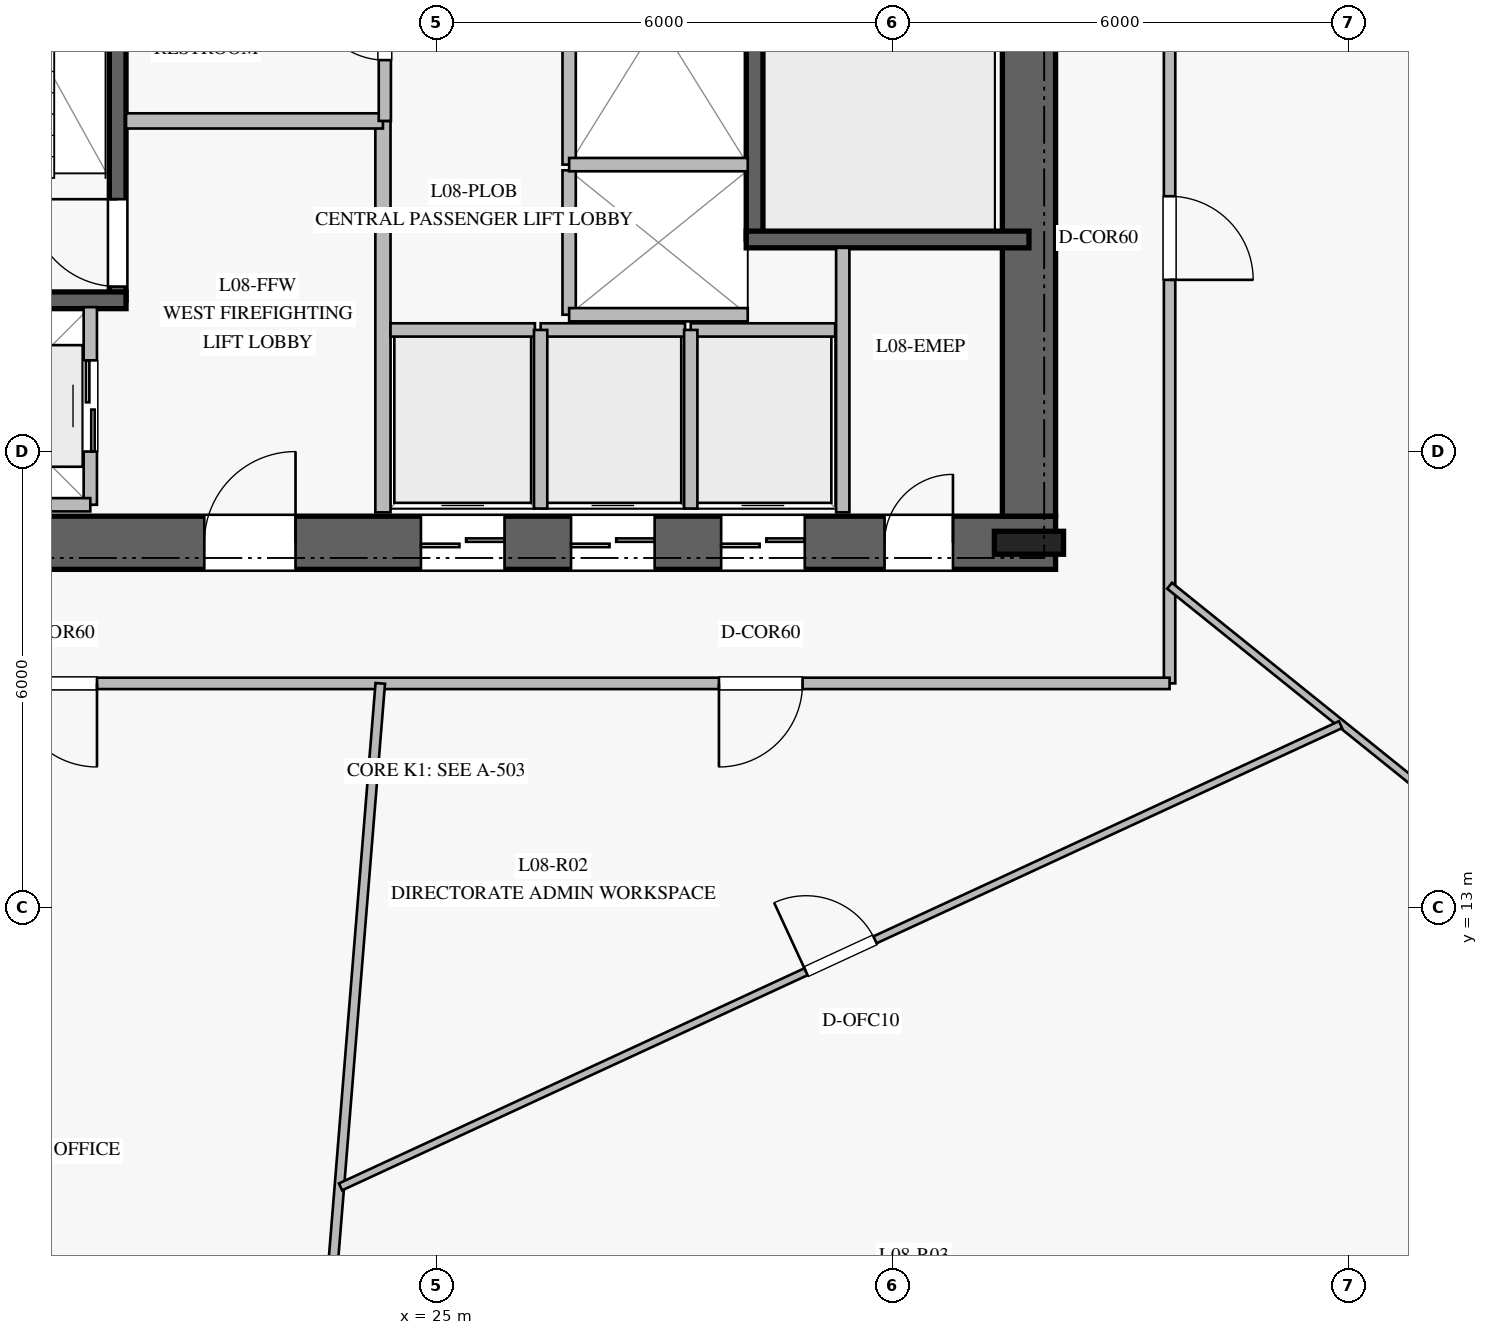
"""IFC4 building model, lengths in metres.
Left out: names, types, materials, properties, quantities, classifications, styles, units other than length and angle.
Written with IfcOpenShell. Run it as: python <this file> out.ifc"""

import sys

from ifc_helpers import new_model, si_unit, direction, frame, frame_2d, origin, origin_2d, place, context, subcontext, project, spatial, rectangle, i_section, extrude, element, fill, save


model = new_model("IFC4")
c1 = context("Model", 3, precision=1e-05, world=origin(), true_north=direction((0.0, 1.0)))
c2 = subcontext(c1, "Body", "Model", "MODEL_VIEW")
j1 = project(units=[si_unit("LENGTHUNIT", "METRE"), si_unit("PLANEANGLEUNIT", "RADIAN")], contexts=[c1])
p1 = place(None, origin())
s1 = spatial("IfcSite", under=j1, at=p1, CompositionType="ELEMENT")
p2 = place(p1, origin())
s2 = spatial("IfcBuilding", under=s1, at=p2, CompositionType="ELEMENT")
p3 = place(p2, frame((0.0, 0.0, 36.0)))
s3 = spatial("IfcBuildingStorey", under=s2, at=p3, CompositionType="ELEMENT", Elevation=36.0)
p4 = place(p3, frame((16.85, 17.8, 0.0), z_axis=(0.0, 0.0, 1.0), x_axis=(1.0, 0.0, 0.0)))
e1 = element("IfcWall", 1, at=p4, inside=s3, PredefinedType="SHEAR", context=c2, shape_type="SweptSolid", body=[
    extrude(rectangle(XDim=16.3, YDim=0.7, at=frame_2d((8.15, 0.0))), origin(), (0.0, 0.0, 1.0), 3.76),
])
p5 = place(p4, frame((5.1, 0.0, 0.0)))
e2 = element("IfcOpeningElement", 2, at=p5, cuts=e1, PredefinedType="OPENING", context=c2, shape_type="SweptSolid", body=[
    extrude(rectangle(XDim=1.2, YDim=2.25, at=frame_2d((0.6, 1.125))), frame((0.0, 0.36, 0.0), z_axis=(0.0, -1.0, 0.0), x_axis=(1.0, 0.0, 0.0)), (0.0, 0.0, 1.0), 0.72),
])
p6 = place(p4, frame((14.05, 0.0, 0.0)))
e3 = element("IfcOpeningElement", 3, at=p6, cuts=e1, PredefinedType="OPENING", context=c2, shape_type="SweptSolid", body=[
    extrude(rectangle(XDim=0.9, YDim=2.1, at=frame_2d((0.45, 1.05))), frame((0.0, 0.36, 0.0), z_axis=(0.0, -1.0, 0.0), x_axis=(1.0, 0.0, 0.0)), (0.0, 0.0, 1.0), 0.72),
])
p7 = place(p4, frame((7.95, 0.0, 0.0)))
e4 = element("IfcOpeningElement", 4, at=p7, cuts=e1, PredefinedType="OPENING", context=c2, shape_type="SweptSolid", body=[
    extrude(rectangle(XDim=1.1, YDim=2.2, at=frame_2d((0.55, 1.1))), frame((0.0, 0.36, 0.0), z_axis=(0.0, -1.0, 0.0), x_axis=(1.0, 0.0, 0.0)), (0.0, 0.0, 1.0), 0.72),
])
p8 = place(p4, frame((9.925, 0.0, 0.0)))
e5 = element("IfcOpeningElement", 5, at=p8, cuts=e1, PredefinedType="OPENING", context=c2, shape_type="SweptSolid", body=[
    extrude(rectangle(XDim=1.1, YDim=2.2, at=frame_2d((0.55, 1.1))), frame((0.0, 0.36, 0.0), z_axis=(0.0, -1.0, 0.0), x_axis=(1.0, 0.0, 0.0)), (0.0, 0.0, 1.0), 0.72),
])
p9 = place(p4, frame((11.9, 0.0, 0.0)))
e6 = element("IfcOpeningElement", 6, at=p9, cuts=e1, PredefinedType="OPENING", context=c2, shape_type="SweptSolid", body=[
    extrude(rectangle(XDim=1.1, YDim=2.2, at=frame_2d((0.55, 1.1))), frame((0.0, 0.36, 0.0), z_axis=(0.0, -1.0, 0.0), x_axis=(1.0, 0.0, 0.0)), (0.0, 0.0, 1.0), 0.72),
])
p10 = place(p3, frame((32.8, 18.15, 0.0), z_axis=(0.0, 0.0, 1.0), x_axis=(0.0, 1.0, 0.0)))
e7 = element("IfcWall", 7, at=p10, inside=s3, PredefinedType="SHEAR", context=c2, shape_type="SweptSolid", body=[
    extrude(rectangle(XDim=13.7, YDim=0.7, at=frame_2d((6.85, 0.0))), origin(), (0.0, 0.0, 1.0), 3.76),
])
p11 = place(p3, frame((32.8, 17.8, 0.0), z_axis=(0.0, 0.0, 1.0), x_axis=(1.0, 0.0, 0.0)))
e8 = element("IfcColumn", 8, at=p11, inside=s3, PredefinedType="COLUMN", context=c2, shape_type="SweptSolid", body=[
    extrude(i_section(OverallWidth=0.302, OverallDepth=0.91, WebThickness=0.021, FlangeThickness=0.04, at=origin_2d()), origin(), (0.0, 0.0, 1.0), 4.0),
])
p12 = place(p3, frame((20.81, 20.99, 0.0), z_axis=(0.0, 0.0, 1.0), x_axis=(0.0, 1.0, 0.0)))
e9 = element("IfcWall", 9, at=p12, inside=s3, PredefinedType="SOLIDWALL", context=c2, shape_type="SweptSolid", body=[
    extrude(rectangle(XDim=7.22, YDim=0.22, at=frame_2d((3.61, 0.0))), origin(), (0.0, 0.0, 1.0), 3.76),
])
p13 = place(p12, frame((0.18, 0.0, 0.0)))
e10 = element("IfcOpeningElement", 10, at=p13, cuts=e9, PredefinedType="OPENING", context=c2, shape_type="SweptSolid", body=[
    extrude(rectangle(XDim=1.15, YDim=2.2, at=frame_2d((0.575, 1.1))), frame((0.0, 0.12, 0.0), z_axis=(0.0, -1.0, 0.0), x_axis=(1.0, 0.0, 0.0)), (0.0, 0.0, 1.0), 0.24),
])
p14 = place(p3, frame((17.2, 20.99, 0.0), z_axis=(0.0, 0.0, 1.0), x_axis=(1.0, 0.0, 0.0)))
e11 = element("IfcWall", 11, at=p14, inside=s3, PredefinedType="SOLIDWALL", context=c2, shape_type="SweptSolid", body=[
    extrude(rectangle(XDim=3.72, YDim=0.22, at=frame_2d((1.86, 0.0))), origin(), (0.0, 0.0, 1.0), 3.76),
])
p15 = place(p3, frame((29.19, 21.79, 0.0), z_axis=(0.0, 0.0, 1.0), x_axis=(0.0, 1.0, 0.0)))
e12 = element("IfcWall", 12, at=p15, inside=s3, PredefinedType="SOLIDWALL", context=c2, shape_type="SweptSolid", body=[
    extrude(rectangle(XDim=7.22, YDim=0.22, at=frame_2d((3.61, 0.0))), origin(), (0.0, 0.0, 1.0), 3.76),
])
p16 = place(p15, frame((5.88, 0.0, 0.0)))
e13 = element("IfcOpeningElement", 13, at=p16, cuts=e12, PredefinedType="OPENING", context=c2, shape_type="SweptSolid", body=[
    extrude(rectangle(XDim=1.15, YDim=2.2, at=frame_2d((0.575, 1.1))), frame((0.0, 0.12, 0.0), z_axis=(0.0, -1.0, 0.0), x_axis=(1.0, 0.0, 0.0)), (0.0, 0.0, 1.0), 0.24),
])
p17 = place(p3, frame((29.08, 21.79, 0.0), z_axis=(0.0, 0.0, 1.0), x_axis=(1.0, 0.0, 0.0)))
e14 = element("IfcWall", 14, at=p17, inside=s3, PredefinedType="SOLIDWALL", context=c2, shape_type="SweptSolid", body=[
    extrude(rectangle(XDim=3.72, YDim=0.22, at=frame_2d((1.86, 0.0))), origin(), (0.0, 0.0, 1.0), 3.76),
])
p18 = place(p3, frame((24.3, 18.2, 0.0), z_axis=(0.0, 0.0, 1.0), x_axis=(0.0, 1.0, 0.0)))
e15 = element("IfcWall", 15, at=p18, inside=s3, PredefinedType="PARTITIONING", context=c2, shape_type="SweptSolid", body=[
    extrude(rectangle(XDim=5.15, YDim=0.2, at=frame_2d((2.575, 0.0))), origin(), (0.0, 0.0, 1.0), 3.76),
])
p19 = place(p3, frame((20.92, 23.35, 0.0), z_axis=(0.0, 0.0, 1.0), x_axis=(1.0, 0.0, 0.0)))
e16 = element("IfcWall", 16, at=p19, inside=s3, PredefinedType="PARTITIONING", context=c2, shape_type="SweptSolid", body=[
    extrude(rectangle(XDim=3.38, YDim=0.2, at=frame_2d((1.69, 0.0))), origin(), (0.0, 0.0, 1.0), 3.76),
])
p20 = place(p3, frame((24.325, 23.35, 0.0), z_axis=(0.0, 0.0, 1.0), x_axis=(0.0, 1.0, 0.0)))
e17 = element("IfcWall", 17, at=p20, inside=s3, PredefinedType="PLUMBINGWALL", context=c2, shape_type="SweptSolid", body=[
    extrude(rectangle(XDim=4.93, YDim=0.16, at=frame_2d((2.465, 0.0))), origin(), (0.0, 0.0, 1.0), 3.76),
])
p21 = place(p20, frame((0.8, 0.0, 0.0)))
e18 = element("IfcOpeningElement", 18, at=p21, cuts=e17, PredefinedType="OPENING", context=c2, shape_type="SweptSolid", body=[
    extrude(rectangle(XDim=0.95, YDim=2.1, at=frame_2d((0.475, 1.05))), frame((0.0, 0.09, 0.0), z_axis=(0.0, -1.0, 0.0), x_axis=(1.0, 0.0, 0.0)), (0.0, 0.0, 1.0), 0.18),
])
p22 = place(p20, frame((3.26, 0.0, 0.0)))
e19 = element("IfcOpeningElement", 19, at=p22, cuts=e17, PredefinedType="OPENING", context=c2, shape_type="SweptSolid", body=[
    extrude(rectangle(XDim=0.9, YDim=2.1, at=frame_2d((0.45, 1.05))), frame((0.0, 0.09, 0.0), z_axis=(0.0, -1.0, 0.0), x_axis=(1.0, 0.0, 0.0)), (0.0, 0.0, 1.0), 0.18),
])
p23 = place(p3, frame((30.35, 18.2, 0.0), z_axis=(0.0, 0.0, 1.0), x_axis=(0.0, 1.0, 0.0)))
e20 = element("IfcWall", 20, at=p23, inside=s3, PredefinedType="PARTITIONING", context=c2, shape_type="SweptSolid", body=[
    extrude(rectangle(XDim=3.48, YDim=0.175, at=frame_2d((1.74, 0.0))), origin(), (0.0, 0.0, 1.0), 3.76),
])
p24 = place(p3, frame((24.4, 20.6, 0.0), z_axis=(0.0, 0.0, 1.0), x_axis=(1.0, 0.0, 0.0)))
e21 = element("IfcWall", 21, at=p24, inside=s3, PredefinedType="PARTITIONING", context=c2, shape_type="SweptSolid", body=[
    extrude(rectangle(XDim=1.9, YDim=0.175, at=frame_2d((0.95, 0.0))), origin(), (0.0, 0.0, 1.0), 3.76),
])
p25 = place(p3, frame((26.375, 20.6, 0.0), z_axis=(0.0, 0.0, 1.0), x_axis=(1.0, 0.0, 0.0)))
e22 = element("IfcWall", 22, at=p25, inside=s3, PredefinedType="PARTITIONING", context=c2, shape_type="SweptSolid", body=[
    extrude(rectangle(XDim=1.9, YDim=0.175, at=frame_2d((0.95, 0.0))), origin(), (0.0, 0.0, 1.0), 3.76),
])
p26 = place(p3, frame((26.375, 18.25, 0.0), z_axis=(0.0, 0.0, 1.0), x_axis=(0.0, 1.0, 0.0)))
e23 = element("IfcWall", 23, at=p26, inside=s3, PredefinedType="PARTITIONING", context=c2, shape_type="SweptSolid", body=[
    extrude(rectangle(XDim=2.35, YDim=0.175, at=frame_2d((1.175, 0.0))), origin(), (0.0, 0.0, 1.0), 3.76),
])
p27 = place(p3, frame((28.35, 20.6, 0.0), z_axis=(0.0, 0.0, 1.0), x_axis=(1.0, 0.0, 0.0)))
e24 = element("IfcWall", 24, at=p27, inside=s3, PredefinedType="PARTITIONING", context=c2, shape_type="SweptSolid", body=[
    extrude(rectangle(XDim=1.9, YDim=0.175, at=frame_2d((0.95, 0.0))), origin(), (0.0, 0.0, 1.0), 3.76),
])
p28 = place(p3, frame((28.35, 18.25, 0.0), z_axis=(0.0, 0.0, 1.0), x_axis=(0.0, 1.0, 0.0)))
e25 = element("IfcWall", 25, at=p28, inside=s3, PredefinedType="PARTITIONING", context=c2, shape_type="SweptSolid", body=[
    extrude(rectangle(XDim=2.35, YDim=0.175, at=frame_2d((1.175, 0.0))), origin(), (0.0, 0.0, 1.0), 3.76),
])
p29 = place(p3, frame((26.75, 20.8, 0.0), z_axis=(0.0, 0.0, 1.0), x_axis=(0.0, 1.0, 0.0)))
e26 = element("IfcWall", 26, at=p29, inside=s3, PredefinedType="PARTITIONING", context=c2, shape_type="SweptSolid", body=[
    extrude(rectangle(XDim=1.9, YDim=0.175, at=frame_2d((0.95, 0.0))), origin(), (0.0, 0.0, 1.0), 3.76),
])
p30 = place(p3, frame((26.75, 20.8, 0.0), z_axis=(0.0, 0.0, 1.0), x_axis=(1.0, 0.0, 0.0)))
e27 = element("IfcWall", 27, at=p30, inside=s3, PredefinedType="PARTITIONING", context=c2, shape_type="SweptSolid", body=[
    extrude(rectangle(XDim=2.35, YDim=0.175, at=frame_2d((1.175, 0.0))), origin(), (0.0, 0.0, 1.0), 3.76),
])
p31 = place(p3, frame((26.75, 22.775, 0.0), z_axis=(0.0, 0.0, 1.0), x_axis=(0.0, 1.0, 0.0)))
e28 = element("IfcWall", 28, at=p31, inside=s3, PredefinedType="PARTITIONING", context=c2, shape_type="SweptSolid", body=[
    extrude(rectangle(XDim=1.9, YDim=0.175, at=frame_2d((0.95, 0.0))), origin(), (0.0, 0.0, 1.0), 3.76),
])
p32 = place(p3, frame((26.75, 22.775, 0.0), z_axis=(0.0, 0.0, 1.0), x_axis=(1.0, 0.0, 0.0)))
e29 = element("IfcWall", 29, at=p32, inside=s3, PredefinedType="PARTITIONING", context=c2, shape_type="SweptSolid", body=[
    extrude(rectangle(XDim=2.35, YDim=0.175, at=frame_2d((1.175, 0.0))), origin(), (0.0, 0.0, 1.0), 3.76),
])
p33 = place(p3, frame((20.45, 18.3, 0.0), z_axis=(0.0, 0.0, 1.0), x_axis=(0.0, 1.0, 0.0)))
e30 = element("IfcWall", 30, at=p33, inside=s3, PredefinedType="PARTITIONING", context=c2, shape_type="SweptSolid", body=[
    extrude(rectangle(XDim=2.6, YDim=0.175, at=frame_2d((1.3, 0.0))), origin(), (0.0, 0.0, 1.0), 3.76),
])
p34 = place(p33, frame((0.7, 0.0, 0.0)))
e31 = element("IfcOpeningElement", 31, at=p34, cuts=e30, PredefinedType="OPENING", context=c2, shape_type="SweptSolid", body=[
    extrude(rectangle(XDim=1.2, YDim=2.2, at=frame_2d((0.6, 1.1))), frame((0.0, 0.098, 0.0), z_axis=(0.0, -1.0, 0.0), x_axis=(1.0, 0.0, 0.0)), (0.0, 0.0, 1.0), 0.195),
])
p35 = place(p3, frame((17.85, 18.3, 0.0), z_axis=(0.0, 0.0, 1.0), x_axis=(1.0, 0.0, 0.0)))
e32 = element("IfcWall", 32, at=p35, inside=s3, PredefinedType="PARTITIONING", context=c2, shape_type="SweptSolid", body=[
    extrude(rectangle(XDim=2.6, YDim=0.175, at=frame_2d((1.3, 0.0))), origin(), (0.0, 0.0, 1.0), 3.76),
])
p36 = place(p3, frame((34.65, 34.05, 0.0), z_axis=(0.0, 0.0, 1.0), x_axis=(0.0, -1.0, 0.0)))
e33 = element("IfcWall", 33, at=p36, inside=s3, PredefinedType="PARTITIONING", context=c2, shape_type="SweptSolid", body=[
    extrude(rectangle(XDim=18.1, YDim=0.15, at=frame_2d((9.05, 0.0))), origin(), (0.0, 0.0, 1.0), 3.21),
])
p37 = place(p36, frame((11.691, 0.0, 0.0)))
e34 = element("IfcOpeningElement", 34, at=p37, cuts=e33, PredefinedType="OPENING", context=c2, shape_type="SweptSolid", body=[
    extrude(rectangle(XDim=1.1, YDim=2.2, at=frame_2d((0.55, 1.1))), frame((0.0, 0.085, 0.0), z_axis=(0.0, -1.0, 0.0), x_axis=(1.0, 0.0, 0.0)), (0.0, 0.0, 1.0), 0.17),
])
p38 = place(p36, frame((3.343, 0.0, 0.0)))
e35 = element("IfcOpeningElement", 35, at=p38, cuts=e33, PredefinedType="OPENING", context=c2, shape_type="SweptSolid", body=[
    extrude(rectangle(XDim=1.1, YDim=2.2, at=frame_2d((0.55, 1.1))), frame((0.0, 0.085, 0.0), z_axis=(0.0, -1.0, 0.0), x_axis=(1.0, 0.0, 0.0)), (0.0, 0.0, 1.0), 0.17),
])
p39 = place(p3, frame((34.65, 15.95, 0.0), z_axis=(0.0, 0.0, 1.0), x_axis=(-1.0, 0.0, 0.0)))
e36 = element("IfcWall", 36, at=p39, inside=s3, PredefinedType="PARTITIONING", context=c2, shape_type="SweptSolid", body=[
    extrude(rectangle(XDim=19.3, YDim=0.15, at=frame_2d((9.65, 0.0))), origin(), (0.0, 0.0, 1.0), 3.21),
])
p40 = place(p39, frame((14.112, 0.0, 0.0)))
e37 = element("IfcOpeningElement", 37, at=p40, cuts=e36, PredefinedType="OPENING", context=c2, shape_type="SweptSolid", body=[
    extrude(rectangle(XDim=1.1, YDim=2.2, at=frame_2d((0.55, 1.1))), frame((0.0, 0.085, 0.0), z_axis=(0.0, -1.0, 0.0), x_axis=(1.0, 0.0, 0.0)), (0.0, 0.0, 1.0), 0.17),
])
p41 = place(p39, frame((4.829, 0.0, 0.0)))
e38 = element("IfcOpeningElement", 38, at=p41, cuts=e36, PredefinedType="OPENING", context=c2, shape_type="SweptSolid", body=[
    extrude(rectangle(XDim=1.1, YDim=2.2, at=frame_2d((0.55, 1.1))), frame((0.0, 0.085, 0.0), z_axis=(0.0, -1.0, 0.0), x_axis=(1.0, 0.0, 0.0)), (0.0, 0.0, 1.0), 0.17),
])
p42 = place(p3, frame((24.265, 15.95, 0.0), z_axis=(0.0, 0.0, 1.0), x_axis=(-0.081013374565, -0.996713014434, 0.0)))
e39 = element("IfcWall", 39, at=p42, inside=s3, PredefinedType="PARTITIONING", context=c2, shape_type="SweptSolid", body=[
    extrude(rectangle(XDim=12.28, YDim=0.125, at=frame_2d((6.14, 0.0))), origin(), (0.0, 0.0, 1.0), 3.05),
])
p43 = place(p3, frame((34.65, 17.235, 0.0), z_axis=(0.0, 0.0, 1.0), x_axis=(0.779103283346, -0.626895584511, 0.0)))
e40 = element("IfcWall", 40, at=p43, inside=s3, PredefinedType="MOVABLE", context=c2, shape_type="SweptSolid", body=[
    extrude(rectangle(XDim=9.271, YDim=0.1, at=frame_2d((4.635, 0.0))), origin(), (0.0, 0.0, 1.0), 3.06),
])
p44 = place(p3, frame((23.742, 9.326, 0.0), z_axis=(0.0, 0.0, 1.0), x_axis=(0.907733462567, 0.419547328601, 0.0)))
e41 = element("IfcWall", 41, at=p44, inside=s3, PredefinedType="MOVABLE", context=c2, shape_type="SweptSolid", body=[
    extrude(rectangle(XDim=14.494, YDim=0.1, at=frame_2d((7.247, 0.0))), origin(), (0.0, 0.0, 1.0), 3.05),
])
p45 = place(p44, frame((6.747, 0.0, 0.0)))
e42 = element("IfcOpeningElement", 42, at=p45, cuts=e41, PredefinedType="OPENING", context=c2, shape_type="SweptSolid", body=[
    extrude(rectangle(XDim=1.0, YDim=2.15, at=frame_2d((0.5, 1.075))), frame((0.0, 0.06, 0.0), z_axis=(0.0, -1.0, 0.0), x_axis=(1.0, 0.0, 0.0)), (0.0, 0.0, 1.0), 0.12),
])
p46 = place(p13, origin())
e43 = element("IfcDoor", 43, at=p46, inside=s3, OperationType="SINGLE_SWING_RIGHT", PredefinedType="DOOR", context=c2, shape_type="SweptSolid", body=[
    extrude(rectangle(XDim=1.15, YDim=2.2, at=frame_2d((0.575, 1.1))), frame((0.0, 0.025, 0.0), z_axis=(0.0, -1.0, 0.0), x_axis=(1.0, 0.0, 0.0)), (0.0, 0.0, 1.0), 0.05),
])
fill(e10, e43)
p47 = place(p5, origin())
e44 = element("IfcDoor", 44, at=p47, inside=s3, OperationType="SINGLE_SWING_RIGHT", PredefinedType="DOOR", context=c2, shape_type="SweptSolid", body=[
    extrude(rectangle(XDim=1.2, YDim=2.25, at=frame_2d((0.6, 1.125))), frame((0.0, 0.025, 0.0), z_axis=(0.0, -1.0, 0.0), x_axis=(1.0, 0.0, 0.0)), (0.0, 0.0, 1.0), 0.05),
])
fill(e2, e44)
p48 = place(p21, origin())
e45 = element("IfcDoor", 45, at=p48, inside=s3, OperationType="SINGLE_SWING_RIGHT", PredefinedType="DOOR", context=c2, shape_type="SweptSolid", body=[
    extrude(rectangle(XDim=0.95, YDim=2.1, at=frame_2d((0.475, 1.05))), frame((0.0, 0.025, 0.0), z_axis=(0.0, -1.0, 0.0), x_axis=(1.0, 0.0, 0.0)), (0.0, 0.0, 1.0), 0.05),
])
fill(e18, e45)
p49 = place(p6, origin())
e46 = element("IfcDoor", 46, at=p49, inside=s3, OperationType="SINGLE_SWING_RIGHT", PredefinedType="DOOR", context=c2, shape_type="SweptSolid", body=[
    extrude(rectangle(XDim=0.9, YDim=2.1, at=frame_2d((0.45, 1.05))), frame((0.0, 0.025, 0.0), z_axis=(0.0, -1.0, 0.0), x_axis=(1.0, 0.0, 0.0)), (0.0, 0.0, 1.0), 0.05),
])
fill(e3, e46)
p50 = place(p7, origin())
e47 = element("IfcDoor", 47, at=p50, inside=s3, OperationType="DOUBLE_DOOR_SLIDING", PredefinedType="DOOR", context=c2, shape_type="SweptSolid", body=[
    extrude(rectangle(XDim=1.1, YDim=2.2, at=frame_2d((0.55, 1.1))), frame((0.0, 0.025, 0.0), z_axis=(0.0, -1.0, 0.0), x_axis=(1.0, 0.0, 0.0)), (0.0, 0.0, 1.0), 0.05),
])
fill(e4, e47)
p51 = place(p8, origin())
e48 = element("IfcDoor", 48, at=p51, inside=s3, OperationType="DOUBLE_DOOR_SLIDING", PredefinedType="DOOR", context=c2, shape_type="SweptSolid", body=[
    extrude(rectangle(XDim=1.1, YDim=2.2, at=frame_2d((0.55, 1.1))), frame((0.0, 0.025, 0.0), z_axis=(0.0, -1.0, 0.0), x_axis=(1.0, 0.0, 0.0)), (0.0, 0.0, 1.0), 0.05),
])
fill(e5, e48)
p52 = place(p9, origin())
e49 = element("IfcDoor", 49, at=p52, inside=s3, OperationType="DOUBLE_DOOR_SLIDING", PredefinedType="DOOR", context=c2, shape_type="SweptSolid", body=[
    extrude(rectangle(XDim=1.1, YDim=2.2, at=frame_2d((0.55, 1.1))), frame((0.0, 0.025, 0.0), z_axis=(0.0, -1.0, 0.0), x_axis=(1.0, 0.0, 0.0)), (0.0, 0.0, 1.0), 0.05),
])
fill(e6, e49)
p53 = place(p34, origin())
e50 = element("IfcDoor", 50, at=p53, inside=s3, OperationType="DOUBLE_DOOR_SLIDING", PredefinedType="DOOR", context=c2, shape_type="SweptSolid", body=[
    extrude(rectangle(XDim=1.2, YDim=2.2, at=frame_2d((0.6, 1.1))), frame((0.0, 0.025, 0.0), z_axis=(0.0, -1.0, 0.0), x_axis=(1.0, 0.0, 0.0)), (0.0, 0.0, 1.0), 0.05),
])
fill(e31, e50)
p54 = place(p40, origin())
e51 = element("IfcDoor", 51, at=p54, inside=s3, OperationType="SINGLE_SWING_LEFT", PredefinedType="DOOR", context=c2, shape_type="SweptSolid", body=[
    extrude(rectangle(XDim=1.1, YDim=2.2, at=frame_2d((0.55, 1.1))), frame((0.0, 0.025, 0.0), z_axis=(0.0, -1.0, 0.0), x_axis=(1.0, 0.0, 0.0)), (0.0, 0.0, 1.0), 0.05),
])
fill(e37, e51)
p55 = place(p41, origin())
e52 = element("IfcDoor", 52, at=p55, inside=s3, OperationType="SINGLE_SWING_RIGHT", PredefinedType="DOOR", context=c2, shape_type="SweptSolid", body=[
    extrude(rectangle(XDim=1.1, YDim=2.2, at=frame_2d((0.55, 1.1))), frame((0.0, 0.025, 0.0), z_axis=(0.0, -1.0, 0.0), x_axis=(1.0, 0.0, 0.0)), (0.0, 0.0, 1.0), 0.05),
])
fill(e38, e52)
p56 = place(p45, origin())
e53 = element("IfcDoor", 53, at=p56, inside=s3, OperationType="SINGLE_SWING_LEFT", PredefinedType="DOOR", context=c2, shape_type="SweptSolid", body=[
    extrude(rectangle(XDim=1.0, YDim=2.15, at=frame_2d((0.5, 1.075))), frame((0.0, 0.025, 0.0), z_axis=(0.0, -1.0, 0.0), x_axis=(1.0, 0.0, 0.0)), (0.0, 0.0, 1.0), 0.05),
])
fill(e42, e53)
p57 = place(p37, origin())
e54 = element("IfcDoor", 54, at=p57, inside=s3, OperationType="SINGLE_SWING_RIGHT", PredefinedType="DOOR", context=c2, shape_type="SweptSolid", body=[
    extrude(rectangle(XDim=1.1, YDim=2.2, at=frame_2d((0.55, 1.1))), frame((0.0, 0.025, 0.0), z_axis=(0.0, -1.0, 0.0), x_axis=(1.0, 0.0, 0.0)), (0.0, 0.0, 1.0), 0.05),
])
fill(e34, e54)
save(model, sys.argv[1])
